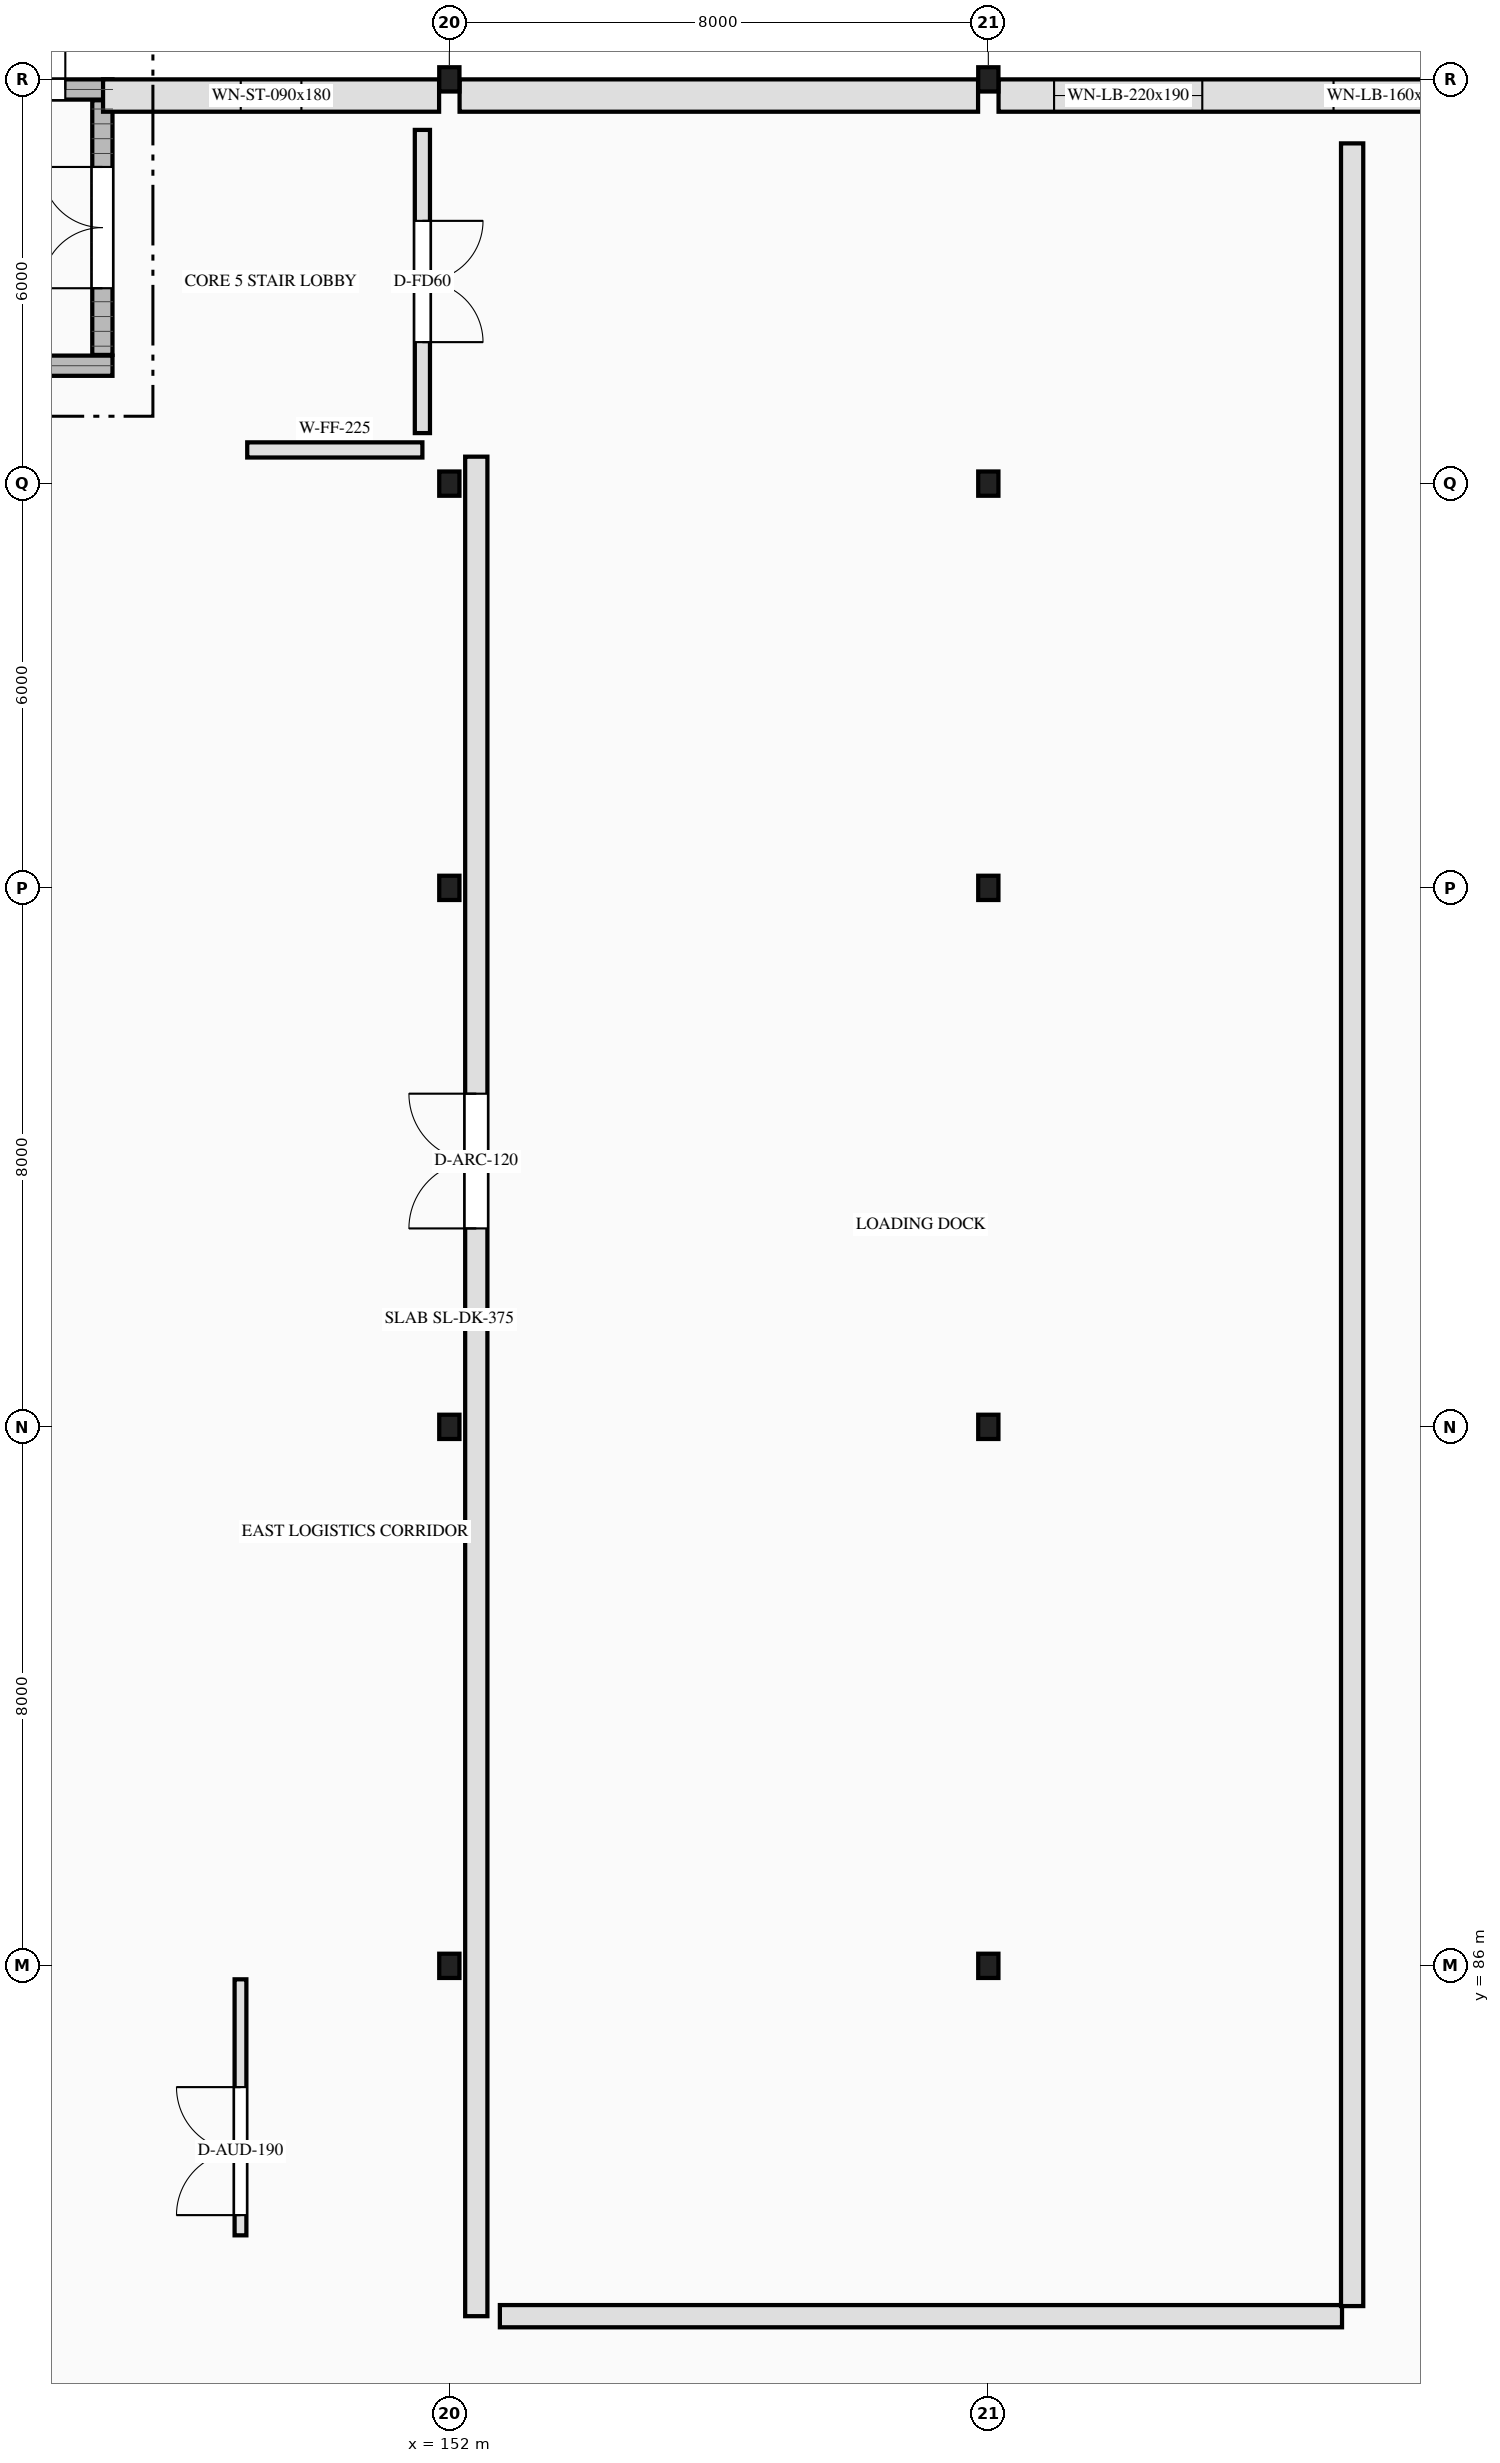
"""IFC4 building model, lengths in metres.
Left out: names, types, materials, properties, quantities, classifications, styles, units other than length and angle.
Written with IfcOpenShell. Run it as: python <this file> out.ifc"""

import sys

from ifc_helpers import new_model, si_unit, direction, frame, frame_2d, origin, origin_2d, place, context, subcontext, project, spatial, rectangle, i_section, extrude, element, fill, save


model = new_model("IFC4")
c1 = context("Model", 3, precision=1e-05, world=origin(), true_north=direction((0.0, 1.0)))
c2 = subcontext(c1, "Body", "Model", "MODEL_VIEW")
j1 = project(units=[si_unit("LENGTHUNIT", "METRE"), si_unit("PLANEANGLEUNIT", "RADIAN")], contexts=[c1])
p1 = place(None, origin())
s1 = spatial("IfcSite", under=j1, at=p1, CompositionType="ELEMENT")
p2 = place(p1, origin())
s2 = spatial("IfcBuilding", under=s1, at=p2, CompositionType="ELEMENT")
p3 = place(p2, origin())
s3 = spatial("IfcBuildingStorey", under=s2, at=p3, CompositionType="ELEMENT", Elevation=0.0)
p4 = place(p3, frame((137.0, 109.75, 0.0), z_axis=(0.0, 0.0, 1.0), x_axis=(1.0, 0.0, 0.0)))
e1 = element("IfcWall", 1, at=p4, inside=s3, PredefinedType="SHEAR", context=c2, shape_type="SweptSolid", body=[
    extrude(rectangle(XDim=10.0, YDim=0.3, at=frame_2d((5.0, 0.0))), origin(), (0.0, 0.0, 1.0), 5.4),
])
p5 = place(p3, frame((137.0, 113.85, 0.0), z_axis=(0.0, 0.0, 1.0), x_axis=(1.0, 0.0, 0.0)))
e2 = element("IfcWall", 2, at=p5, inside=s3, PredefinedType="SHEAR", context=c2, shape_type="SweptSolid", body=[
    extrude(rectangle(XDim=10.0, YDim=0.3, at=frame_2d((5.0, 0.0))), origin(), (0.0, 0.0, 1.0), 5.4),
])
p6 = place(p5, frame((7.45, 0.0, 0.0)))
e3 = element("IfcOpeningElement", 3, at=p6, cuts=e2, PredefinedType="OPENING", context=c2, shape_type="SweptSolid", body=[
    extrude(rectangle(XDim=1.85, YDim=2.3, at=frame_2d((0.925, 1.15))), frame((0.0, 0.16, 0.0), z_axis=(0.0, -1.0, 0.0), x_axis=(1.0, 0.0, 0.0)), (0.0, 0.0, 1.0), 0.32),
])
p7 = place(p3, frame((146.85, 109.91, 0.0), z_axis=(0.0, 0.0, 1.0), x_axis=(0.0, 1.0, 0.0)))
e4 = element("IfcWall", 4, at=p7, inside=s3, PredefinedType="SHEAR", context=c2, shape_type="SweptSolid", body=[
    extrude(rectangle(XDim=3.78, YDim=0.3, at=frame_2d((1.89, 0.0))), origin(), (0.0, 0.0, 1.0), 5.4),
])
p8 = place(p7, frame((0.99, 0.0, 0.0)))
e5 = element("IfcOpeningElement", 5, at=p8, cuts=e4, PredefinedType="OPENING", context=c2, shape_type="SweptSolid", body=[
    extrude(rectangle(XDim=1.8, YDim=2.2, at=frame_2d((0.9, 1.1))), frame((0.0, 0.16, 0.0), z_axis=(0.0, -1.0, 0.0), x_axis=(1.0, 0.0, 0.0)), (0.0, 0.0, 1.0), 0.32),
])
for number, where, z_axis, x_axis in (
    (6, (152.0, 86.0, 0.0), (0.0, 0.0, 1.0), (1.0, 0.0, 0.0)),
    (7, (152.0, 94.0, 0.0), (0.0, 0.0, 1.0), (1.0, 0.0, 0.0)),
    (8, (152.0, 102.0, 0.0), (0.0, 0.0, 1.0), (1.0, 0.0, 0.0)),
    (9, (152.0, 108.0, 0.0), (0.0, 0.0, 1.0), (1.0, 0.0, 0.0)),
    (10, (152.0, 114.0, 0.0), (0.0, 0.0, 1.0), (1.0, 0.0, 0.0)),
    (11, (160.0, 86.0, 0.0), (0.0, 0.0, 1.0), (1.0, 0.0, 0.0)),
    (12, (160.0, 94.0, 0.0), (0.0, 0.0, 1.0), (1.0, 0.0, 0.0)),
    (13, (160.0, 102.0, 0.0), (0.0, 0.0, 1.0), (1.0, 0.0, 0.0)),
    (14, (160.0, 108.0, 0.0), (0.0, 0.0, 1.0), (1.0, 0.0, 0.0)),
    (15, (160.0, 114.0, 0.0), (0.0, 0.0, 1.0), (1.0, 0.0, 0.0)),
):
    element("IfcColumn", number, at=place(p3, frame(where, z_axis=z_axis, x_axis=x_axis)), inside=s3, PredefinedType="COLUMN", context=c2, shape_type="SweptSolid", body=[
        extrude(i_section(OverallWidth=0.3, OverallDepth=0.36, WebThickness=0.012, FlangeThickness=0.022, FilletRadius=0.027, at=origin_2d()), origin(), (0.0, 0.0, 1.0), 5.4),
    ])
p9 = place(p3, frame((146.86, 113.76, 0.0), z_axis=(0.0, 0.0, 1.0), x_axis=(1.0, 0.0, 0.0)))
e16 = element("IfcWall", 16, at=p9, inside=s3, PredefinedType="SOLIDWALL", context=c2, shape_type="SweptSolid", body=[
    extrude(rectangle(XDim=4.988, YDim=0.48, at=frame_2d((2.494, 0.0))), origin(), (0.0, 0.0, 1.0), 4.725),
])
p10 = place(p9, frame((2.044, 0.0, 0.85)))
e17 = element("IfcOpeningElement", 17, at=p10, cuts=e16, PredefinedType="OPENING", context=c2, shape_type="SweptSolid", body=[
    extrude(rectangle(XDim=0.9, YDim=1.8, at=frame_2d((0.45, 0.9))), frame((0.0, 0.25, 0.0), z_axis=(0.0, -1.0, 0.0), x_axis=(1.0, 0.0, 0.0)), (0.0, 0.0, 1.0), 0.5),
])
p11 = place(p3, frame((152.152, 113.76, 0.0), z_axis=(0.0, 0.0, 1.0), x_axis=(1.0, 0.0, 0.0)))
e18 = element("IfcWall", 18, at=p11, inside=s3, PredefinedType="SOLIDWALL", context=c2, shape_type="SweptSolid", body=[
    extrude(rectangle(XDim=7.696, YDim=0.48, at=frame_2d((3.848, 0.0))), origin(), (0.0, 0.0, 1.0), 4.725),
])
p12 = place(p3, frame((160.152, 113.76, 0.0), z_axis=(0.0, 0.0, 1.0), x_axis=(1.0, 0.0, 0.0)))
e19 = element("IfcWall", 19, at=p12, inside=s3, PredefinedType="SOLIDWALL", context=c2, shape_type="SweptSolid", body=[
    extrude(rectangle(XDim=7.696, YDim=0.48, at=frame_2d((3.848, 0.0))), origin(), (0.0, 0.0, 1.0), 4.725),
])
p13 = place(p12, frame((0.824, 0.0, 0.85)))
e20 = element("IfcOpeningElement", 20, at=p13, cuts=e19, PredefinedType="OPENING", context=c2, shape_type="SweptSolid", body=[
    extrude(rectangle(XDim=2.2, YDim=1.9, at=frame_2d((1.1, 0.95))), frame((0.0, 0.25, 0.0), z_axis=(0.0, -1.0, 0.0), x_axis=(1.0, 0.0, 0.0)), (0.0, 0.0, 1.0), 0.5),
])
p14 = place(p12, frame((4.972, 0.0, 0.85)))
e21 = element("IfcOpeningElement", 21, at=p14, cuts=e19, PredefinedType="OPENING", context=c2, shape_type="SweptSolid", body=[
    extrude(rectangle(XDim=1.6, YDim=1.8, at=frame_2d((0.8, 0.9))), frame((0.0, 0.25, 0.0), z_axis=(0.0, -1.0, 0.0), x_axis=(1.0, 0.0, 0.0)), (0.0, 0.0, 1.0), 0.5),
])
p15 = place(p3, frame((149.0, 108.5, 0.0), z_axis=(0.0, 0.0, 1.0), x_axis=(1.0, 0.0, 0.0)))
e22 = element("IfcWall", 22, at=p15, inside=s3, PredefinedType="SOLIDWALL", context=c2, shape_type="SweptSolid", body=[
    extrude(rectangle(XDim=2.6, YDim=0.225, at=frame_2d((1.3, 0.0))), origin(), (0.0, 0.0, 1.0), 5.05),
])
p16 = place(p3, frame((148.9, 82.0, 0.0), z_axis=(0.0, 0.0, 1.0), x_axis=(0.0, 1.0, 0.0)))
e23 = element("IfcWall", 23, at=p16, inside=s3, PredefinedType="PARTITIONING", context=c2, shape_type="SweptSolid", body=[
    extrude(rectangle(XDim=3.8, YDim=0.175, at=frame_2d((1.9, 0.0))), origin(), (0.0, 0.0, 1.0), 5.05),
])
p17 = place(p16, frame((0.3, 0.0, 0.0)))
e24 = element("IfcOpeningElement", 24, at=p17, cuts=e23, PredefinedType="OPENING", context=c2, shape_type="SweptSolid", body=[
    extrude(rectangle(XDim=1.9, YDim=2.35, at=frame_2d((0.95, 1.175))), frame((0.0, 0.097, 0.0), z_axis=(0.0, -1.0, 0.0), x_axis=(1.0, 0.0, 0.0)), (0.0, 0.0, 1.0), 0.195),
])
p18 = place(p3, frame((152.4, 80.8, 0.0), z_axis=(0.0, 0.0, 1.0), x_axis=(0.0, 1.0, 0.0)))
e25 = element("IfcWall", 25, at=p18, inside=s3, PredefinedType="SOLIDWALL", context=c2, shape_type="SweptSolid", body=[
    extrude(rectangle(XDim=27.6, YDim=0.33, at=frame_2d((13.8, 0.0))), origin(), (0.0, 0.0, 1.0), 5.05),
])
p19 = place(p18, frame((16.145, 0.0, 0.0)))
e26 = element("IfcOpeningElement", 26, at=p19, cuts=e25, PredefinedType="OPENING", context=c2, shape_type="SweptSolid", body=[
    extrude(rectangle(XDim=2.0, YDim=2.5, at=frame_2d((1.0, 1.25))), frame((0.0, 0.175, 0.0), z_axis=(0.0, -1.0, 0.0), x_axis=(1.0, 0.0, 0.0)), (0.0, 0.0, 1.0), 0.35),
])
p20 = place(p3, frame((151.6, 113.25, 0.0), z_axis=(0.0, 0.0, 1.0), x_axis=(0.0, -1.0, 0.0)))
e27 = element("IfcWall", 27, at=p20, inside=s3, PredefinedType="SOLIDWALL", context=c2, shape_type="SweptSolid", body=[
    extrude(rectangle(XDim=4.5, YDim=0.225, at=frame_2d((2.25, 0.0))), origin(), (0.0, 0.0, 1.0), 5.05),
])
p21 = place(p20, frame((1.35, 0.0, 0.0)))
e28 = element("IfcOpeningElement", 28, at=p21, cuts=e27, PredefinedType="OPENING", context=c2, shape_type="SweptSolid", body=[
    extrude(rectangle(XDim=1.8, YDim=2.2, at=frame_2d((0.9, 1.1))), frame((0.0, 0.123, 0.0), z_axis=(0.0, -1.0, 0.0), x_axis=(1.0, 0.0, 0.0)), (0.0, 0.0, 1.0), 0.245),
])
p22 = place(p3, frame((152.75, 80.8, 0.0), z_axis=(0.0, 0.0, 1.0), x_axis=(1.0, 0.0, 0.0)))
e29 = element("IfcWall", 29, at=p22, inside=s3, PredefinedType="SOLIDWALL", context=c2, shape_type="SweptSolid", body=[
    extrude(rectangle(XDim=12.5, YDim=0.33, at=frame_2d((6.25, 0.0))), origin(), (0.0, 0.0, 1.0), 5.05),
])
p23 = place(p3, frame((165.4, 80.95, 0.0), z_axis=(0.0, 0.0, 1.0), x_axis=(0.0, 1.0, 0.0)))
e30 = element("IfcWall", 30, at=p23, inside=s3, PredefinedType="SOLIDWALL", context=c2, shape_type="SweptSolid", body=[
    extrude(rectangle(XDim=32.1, YDim=0.33, at=frame_2d((16.05, 0.0))), origin(), (0.0, 0.0, 1.0), 4.72),
])
p24 = place(p10, origin())
e31 = element("IfcWindow", 31, at=p24, inside=s3, PartitioningType="SINGLE_PANEL", PredefinedType="WINDOW", context=c2, shape_type="SweptSolid", body=[
    extrude(rectangle(XDim=0.9, YDim=1.8, at=frame_2d((0.45, 0.9))), frame((0.0, 0.03, 0.0), z_axis=(0.0, -1.0, 0.0), x_axis=(1.0, 0.0, 0.0)), (0.0, 0.0, 1.0), 0.06),
])
fill(e17, e31)
p25 = place(p13, origin())
e32 = element("IfcWindow", 32, at=p25, inside=s3, PartitioningType="TRIPLE_PANEL_VERTICAL", PredefinedType="WINDOW", context=c2, shape_type="SweptSolid", body=[
    extrude(rectangle(XDim=2.2, YDim=1.9, at=frame_2d((1.1, 0.95))), frame((0.0, 0.03, 0.0), z_axis=(0.0, -1.0, 0.0), x_axis=(1.0, 0.0, 0.0)), (0.0, 0.0, 1.0), 0.06),
])
fill(e20, e32)
p26 = place(p14, origin())
e33 = element("IfcWindow", 33, at=p26, inside=s3, PartitioningType="DOUBLE_PANEL_VERTICAL", PredefinedType="WINDOW", context=c2, shape_type="SweptSolid", body=[
    extrude(rectangle(XDim=1.6, YDim=1.8, at=frame_2d((0.8, 0.9))), frame((0.0, 0.03, 0.0), z_axis=(0.0, -1.0, 0.0), x_axis=(1.0, 0.0, 0.0)), (0.0, 0.0, 1.0), 0.06),
])
fill(e21, e33)
p27 = place(p6, origin())
e34 = element("IfcDoor", 34, at=p27, inside=s3, OperationType="DOUBLE_DOOR_SINGLE_SWING", PredefinedType="DOOR", context=c2, shape_type="SweptSolid", body=[
    extrude(rectangle(XDim=1.85, YDim=2.3, at=frame_2d((0.925, 1.15))), frame((0.0, 0.025, 0.0), z_axis=(0.0, -1.0, 0.0), x_axis=(1.0, 0.0, 0.0)), (0.0, 0.0, 1.0), 0.05),
])
fill(e3, e34)
p28 = place(p8, origin())
e35 = element("IfcDoor", 35, at=p28, inside=s3, OperationType="DOUBLE_DOOR_SINGLE_SWING", PredefinedType="DOOR", context=c2, shape_type="SweptSolid", body=[
    extrude(rectangle(XDim=1.8, YDim=2.2, at=frame_2d((0.9, 1.1))), frame((0.0, 0.025, 0.0), z_axis=(0.0, -1.0, 0.0), x_axis=(1.0, 0.0, 0.0)), (0.0, 0.0, 1.0), 0.05),
])
fill(e5, e35)
p29 = place(p17, origin())
e36 = element("IfcDoor", 36, at=p29, inside=s3, OperationType="DOUBLE_DOOR_SINGLE_SWING", PredefinedType="DOOR", context=c2, shape_type="SweptSolid", body=[
    extrude(rectangle(XDim=1.9, YDim=2.35, at=frame_2d((0.95, 1.175))), frame((0.0, 0.025, 0.0), z_axis=(0.0, -1.0, 0.0), x_axis=(1.0, 0.0, 0.0)), (0.0, 0.0, 1.0), 0.05),
])
fill(e24, e36)
p30 = place(p19, origin())
e37 = element("IfcDoor", 37, at=p30, inside=s3, OperationType="DOUBLE_DOOR_SINGLE_SWING", PredefinedType="DOOR", context=c2, shape_type="SweptSolid", body=[
    extrude(rectangle(XDim=2.0, YDim=2.5, at=frame_2d((1.0, 1.25))), frame((0.0, 0.025, 0.0), z_axis=(0.0, -1.0, 0.0), x_axis=(1.0, 0.0, 0.0)), (0.0, 0.0, 1.0), 0.05),
])
fill(e26, e37)
p31 = place(p21, origin())
e38 = element("IfcDoor", 38, at=p31, inside=s3, OperationType="DOUBLE_DOOR_SINGLE_SWING", PredefinedType="DOOR", context=c2, shape_type="SweptSolid", body=[
    extrude(rectangle(XDim=1.8, YDim=2.2, at=frame_2d((0.9, 1.1))), frame((0.0, 0.025, 0.0), z_axis=(0.0, -1.0, 0.0), x_axis=(1.0, 0.0, 0.0)), (0.0, 0.0, 1.0), 0.05),
])
fill(e28, e38)
save(model, sys.argv[1])
